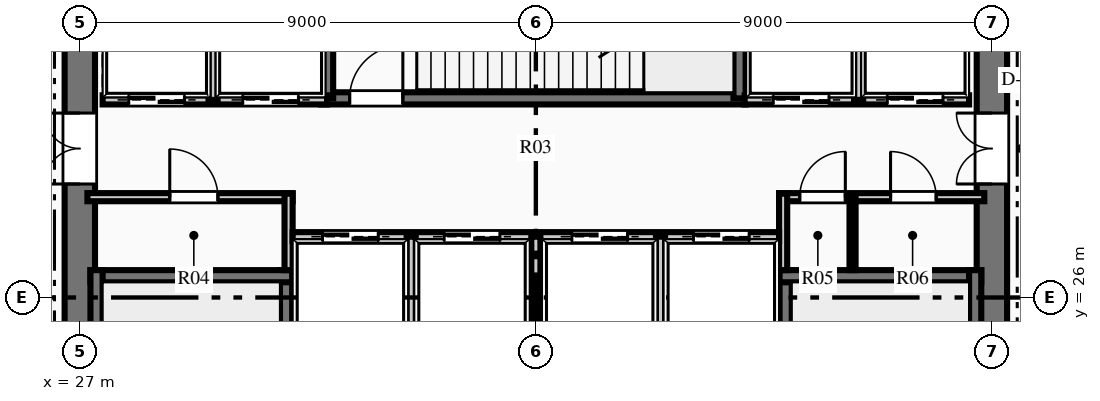
"""IFC4 building model, lengths in metres.
Left out: names, types, materials, properties, quantities, classifications, styles, units other than length and angle.
Written with IfcOpenShell. Run it as: python <this file> out.ifc"""

import sys

from ifc_helpers import new_model, si_unit, direction, frame, frame_2d, origin, place, context, subcontext, project, spatial, rectangle, extrude, element, fill, save


model = new_model("IFC4")
c1 = context("Model", 3, precision=1e-05, world=origin(), true_north=direction((0.0, 1.0)))
c2 = subcontext(c1, "Body", "Model", "MODEL_VIEW")
j1 = project(units=[si_unit("LENGTHUNIT", "METRE"), si_unit("PLANEANGLEUNIT", "RADIAN")], contexts=[c1])
p1 = place(None, origin())
s1 = spatial("IfcSite", under=j1, at=p1, CompositionType="ELEMENT")
p2 = place(p1, origin())
s2 = spatial("IfcBuilding", under=s1, at=p2, CompositionType="ELEMENT")
p3 = place(p2, origin())
s3 = spatial("IfcBuildingStorey", under=s2, at=p3, CompositionType="ELEMENT", Elevation=0.0)
p4 = place(p3, frame((27.0, 18.3, 0.0), z_axis=(0.0, 0.0, 1.0), x_axis=(0.0, 1.0, 0.0)))
e1 = element("IfcWall", 1, at=p4, inside=s3, PredefinedType="SHEAR", context=c2, shape_type="SweptSolid", body=[
    extrude(rectangle(XDim=15.4, YDim=0.6, at=frame_2d((7.7, 0.0))), origin(), (0.0, 0.0, 1.0), 6.0),
])
p5 = place(p4, frame((9.94, 0.0, 0.0)))
e2 = element("IfcOpeningElement", 2, at=p5, cuts=e1, PredefinedType="OPENING", context=c2, shape_type="SweptSolid", body=[
    extrude(rectangle(XDim=1.4, YDim=2.2, at=frame_2d((0.7, 1.1))), frame((0.0, 0.31, 0.0), z_axis=(0.0, -1.0, 0.0), x_axis=(1.0, 0.0, 0.0)), (0.0, 0.0, 1.0), 0.62),
])
p6 = place(p3, frame((45.0, 18.3, 0.0), z_axis=(0.0, 0.0, 1.0), x_axis=(0.0, 1.0, 0.0)))
e3 = element("IfcWall", 3, at=p6, inside=s3, PredefinedType="SHEAR", context=c2, shape_type="SweptSolid", body=[
    extrude(rectangle(XDim=15.4, YDim=0.6, at=frame_2d((7.7, 0.0))), origin(), (0.0, 0.0, 1.0), 6.0),
])
p7 = place(p6, frame((9.94, 0.0, 0.0)))
e4 = element("IfcOpeningElement", 4, at=p7, cuts=e3, PredefinedType="OPENING", context=c2, shape_type="SweptSolid", body=[
    extrude(rectangle(XDim=1.4, YDim=2.2, at=frame_2d((0.7, 1.1))), frame((0.0, 0.31, 0.0), z_axis=(0.0, -1.0, 0.0), x_axis=(1.0, 0.0, 0.0)), (0.0, 0.0, 1.0), 0.62),
])
p8 = place(p3, frame((31.07, 18.28, 0.0), z_axis=(0.0, 0.0, 1.0), x_axis=(0.0, 1.0, 0.0)))
e5 = element("IfcWall", 5, at=p8, inside=s3, PredefinedType="SHEAR", context=c2, shape_type="SweptSolid", body=[
    extrude(rectangle(XDim=8.26, YDim=0.24, at=frame_2d((4.13, 0.0))), origin(), (0.0, 0.0, 1.0), 6.0),
])
p9 = place(p8, frame((0.365, 0.0, 0.0)))
e6 = element("IfcOpeningElement", 6, at=p9, cuts=e5, PredefinedType="OPENING", context=c2, shape_type="SweptSolid", body=[
    extrude(rectangle(XDim=1.05, YDim=2.15, at=frame_2d((0.525, 1.075))), frame((0.0, 0.13, 0.0), z_axis=(0.0, -1.0, 0.0), x_axis=(1.0, 0.0, 0.0)), (0.0, 0.0, 1.0), 0.26),
])
p10 = place(p3, frame((27.21, 26.42, 0.0), z_axis=(0.0, 0.0, 1.0), x_axis=(1.0, 0.0, 0.0)))
e7 = element("IfcWall", 7, at=p10, inside=s3, PredefinedType="SHEAR", context=c2, shape_type="SweptSolid", body=[
    extrude(rectangle(XDim=3.98, YDim=0.24, at=frame_2d((1.99, 0.0))), origin(), (0.0, 0.0, 1.0), 6.0),
])
p11 = place(p3, frame((27.33, 18.28, 0.0), z_axis=(0.0, 0.0, 1.0), x_axis=(0.0, 1.0, 0.0)))
e8 = element("IfcWall", 8, at=p11, inside=s3, PredefinedType="SHEAR", context=c2, shape_type="SweptSolid", body=[
    extrude(rectangle(XDim=8.26, YDim=0.24, at=frame_2d((4.13, 0.0))), origin(), (0.0, 0.0, 1.0), 6.0),
])
p12 = place(p3, frame((40.93, 18.28, 0.0), z_axis=(0.0, 0.0, 1.0), x_axis=(0.0, 1.0, 0.0)))
e9 = element("IfcWall", 9, at=p12, inside=s3, PredefinedType="SHEAR", context=c2, shape_type="SweptSolid", body=[
    extrude(rectangle(XDim=8.26, YDim=0.24, at=frame_2d((4.13, 0.0))), origin(), (0.0, 0.0, 1.0), 6.0),
])
p13 = place(p12, frame((0.365, 0.0, 0.0)))
e10 = element("IfcOpeningElement", 10, at=p13, cuts=e9, PredefinedType="OPENING", context=c2, shape_type="SweptSolid", body=[
    extrude(rectangle(XDim=1.05, YDim=2.15, at=frame_2d((0.525, 1.075))), frame((0.0, 0.13, 0.0), z_axis=(0.0, -1.0, 0.0), x_axis=(1.0, 0.0, 0.0)), (0.0, 0.0, 1.0), 0.26),
])
p14 = place(p3, frame((40.81, 26.42, 0.0), z_axis=(0.0, 0.0, 1.0), x_axis=(1.0, 0.0, 0.0)))
e11 = element("IfcWall", 11, at=p14, inside=s3, PredefinedType="SHEAR", context=c2, shape_type="SweptSolid", body=[
    extrude(rectangle(XDim=3.98, YDim=0.24, at=frame_2d((1.99, 0.0))), origin(), (0.0, 0.0, 1.0), 6.0),
])
p15 = place(p3, frame((44.67, 18.28, 0.0), z_axis=(0.0, 0.0, 1.0), x_axis=(0.0, 1.0, 0.0)))
e12 = element("IfcWall", 12, at=p15, inside=s3, PredefinedType="SHEAR", context=c2, shape_type="SweptSolid", body=[
    extrude(rectangle(XDim=8.26, YDim=0.24, at=frame_2d((4.13, 0.0))), origin(), (0.0, 0.0, 1.0), 6.0),
])
p16 = place(p3, frame((31.76, 29.93, 0.0), z_axis=(0.0, 0.0, 1.0), x_axis=(1.0, 0.0, 0.0)))
e13 = element("IfcWall", 13, at=p16, inside=s3, PredefinedType="SHEAR", context=c2, shape_type="SweptSolid", body=[
    extrude(rectangle(XDim=8.38, YDim=0.24, at=frame_2d((4.19, 0.0))), origin(), (0.0, 0.0, 1.0), 6.0),
])
p17 = place(p16, frame((0.565, 0.0, 0.0)))
e14 = element("IfcOpeningElement", 14, at=p17, cuts=e13, PredefinedType="OPENING", context=c2, shape_type="SweptSolid", body=[
    extrude(rectangle(XDim=1.05, YDim=2.15, at=frame_2d((0.525, 1.075))), frame((0.0, 0.13, 0.0), z_axis=(0.0, -1.0, 0.0), x_axis=(1.0, 0.0, 0.0)), (0.0, 0.0, 1.0), 0.26),
])
p18 = place(p3, frame((31.88, 29.93, 0.0), z_axis=(0.0, 0.0, 1.0), x_axis=(0.0, 1.0, 0.0)))
e15 = element("IfcWall", 15, at=p18, inside=s3, PredefinedType="SHEAR", context=c2, shape_type="SweptSolid", body=[
    extrude(rectangle(XDim=3.79, YDim=0.24, at=frame_2d((1.895, 0.0))), origin(), (0.0, 0.0, 1.0), 6.0),
])
p19 = place(p3, frame((40.02, 29.93, 0.0), z_axis=(0.0, 0.0, 1.0), x_axis=(0.0, 1.0, 0.0)))
e16 = element("IfcWall", 16, at=p19, inside=s3, PredefinedType="SHEAR", context=c2, shape_type="SweptSolid", body=[
    extrude(rectangle(XDim=3.85, YDim=0.24, at=frame_2d((1.925, 0.0))), origin(), (0.0, 0.0, 1.0), 6.0),
])
p20 = place(p3, frame((27.15, 27.98, 0.0), z_axis=(0.0, 0.0, 1.0), x_axis=(1.0, 0.0, 0.0)))
e17 = element("IfcWall", 17, at=p20, inside=s3, PredefinedType="PARTITIONING", context=c2, shape_type="SweptSolid", body=[
    extrude(rectangle(XDim=4.05, YDim=0.16, at=frame_2d((2.025, 0.0))), origin(), (0.0, 0.0, 1.0), 5.67),
])
p21 = place(p20, frame((1.625, 0.0, 0.0)))
e18 = element("IfcOpeningElement", 18, at=p21, cuts=e17, PredefinedType="OPENING", context=c2, shape_type="SweptSolid", body=[
    extrude(rectangle(XDim=0.95, YDim=2.15, at=frame_2d((0.475, 1.075))), frame((0.0, 0.09, 0.0), z_axis=(0.0, -1.0, 0.0), x_axis=(1.0, 0.0, 0.0)), (0.0, 0.0, 1.0), 0.18),
])
p22 = place(p3, frame((31.12, 26.54, 0.0), z_axis=(0.0, 0.0, 1.0), x_axis=(0.0, 1.0, 0.0)))
e19 = element("IfcWall", 19, at=p22, inside=s3, PredefinedType="PARTITIONING", context=c2, shape_type="SweptSolid", body=[
    extrude(rectangle(XDim=1.51, YDim=0.16, at=frame_2d((0.755, 0.0))), origin(), (0.0, 0.0, 1.0), 5.67),
])
p23 = place(p3, frame((40.8, 27.98, 0.0), z_axis=(0.0, 0.0, 1.0), x_axis=(1.0, 0.0, 0.0)))
e20 = element("IfcWall", 20, at=p23, inside=s3, PredefinedType="PARTITIONING", context=c2, shape_type="SweptSolid", body=[
    extrude(rectangle(XDim=4.05, YDim=0.16, at=frame_2d((2.025, 0.0))), origin(), (0.0, 0.0, 1.0), 5.67),
])
p24 = place(p23, frame((0.407, 0.0, 0.0)))
e21 = element("IfcOpeningElement", 21, at=p24, cuts=e20, PredefinedType="OPENING", context=c2, shape_type="SweptSolid", body=[
    extrude(rectangle(XDim=0.9, YDim=2.15, at=frame_2d((0.45, 1.075))), frame((0.0, 0.09, 0.0), z_axis=(0.0, -1.0, 0.0), x_axis=(1.0, 0.0, 0.0)), (0.0, 0.0, 1.0), 0.18),
])
p25 = place(p23, frame((2.2, 0.0, 0.0)))
e22 = element("IfcOpeningElement", 22, at=p25, cuts=e20, PredefinedType="OPENING", context=c2, shape_type="SweptSolid", body=[
    extrude(rectangle(XDim=0.9, YDim=2.15, at=frame_2d((0.45, 1.075))), frame((0.0, 0.09, 0.0), z_axis=(0.0, -1.0, 0.0), x_axis=(1.0, 0.0, 0.0)), (0.0, 0.0, 1.0), 0.18),
])
p26 = place(p3, frame((40.88, 26.54, 0.0), z_axis=(0.0, 0.0, 1.0), x_axis=(0.0, 1.0, 0.0)))
e23 = element("IfcWall", 23, at=p26, inside=s3, PredefinedType="PARTITIONING", context=c2, shape_type="SweptSolid", body=[
    extrude(rectangle(XDim=1.51, YDim=0.16, at=frame_2d((0.755, 0.0))), origin(), (0.0, 0.0, 1.0), 5.67),
])
p27 = place(p3, frame((42.25, 26.54, 0.0), z_axis=(0.0, 0.0, 1.0), x_axis=(0.0, 1.0, 0.0)))
e24 = element("IfcWall", 24, at=p27, inside=s3, PredefinedType="PARTITIONING", context=c2, shape_type="SweptSolid", body=[
    extrude(rectangle(XDim=1.44, YDim=0.12, at=frame_2d((0.72, 0.0))), origin(), (0.0, 0.0, 1.0), 5.67),
])
p28 = place(p3, frame((27.45, 29.9, 0.0), z_axis=(0.0, 0.0, 1.0), x_axis=(1.0, 0.0, 0.0)))
e25 = element("IfcWall", 25, at=p28, inside=s3, PredefinedType="PARTITIONING", context=c2, shape_type="SweptSolid", body=[
    extrude(rectangle(XDim=4.43, YDim=0.18, at=frame_2d((2.215, 0.0))), origin(), (0.0, 0.0, 1.0), 5.67),
])
p29 = place(p28, frame((0.515, 0.0, 0.0)))
e26 = element("IfcOpeningElement", 26, at=p29, cuts=e25, PredefinedType="OPENING", context=c2, shape_type="SweptSolid", body=[
    extrude(rectangle(XDim=1.1, YDim=2.15, at=frame_2d((0.55, 1.075))), frame((0.0, 0.1, 0.0), z_axis=(0.0, -1.0, 0.0), x_axis=(1.0, 0.0, 0.0)), (0.0, 0.0, 1.0), 0.2),
])
p30 = place(p28, frame((2.765, 0.0, 0.0)))
e27 = element("IfcOpeningElement", 27, at=p30, cuts=e25, PredefinedType="OPENING", context=c2, shape_type="SweptSolid", body=[
    extrude(rectangle(XDim=1.1, YDim=2.15, at=frame_2d((0.55, 1.075))), frame((0.0, 0.1, 0.0), z_axis=(0.0, -1.0, 0.0), x_axis=(1.0, 0.0, 0.0)), (0.0, 0.0, 1.0), 0.2),
])
p31 = place(p3, frame((29.63, 29.9, 0.0), z_axis=(0.0, 0.0, 1.0), x_axis=(0.0, 1.0, 0.0)))
e28 = element("IfcWall", 28, at=p31, inside=s3, PredefinedType="PARTITIONING", context=c2, shape_type="SweptSolid", body=[
    extrude(rectangle(XDim=3.75, YDim=0.18, at=frame_2d((1.875, 0.0))), origin(), (0.0, 0.0, 1.0), 5.67),
])
p32 = place(p3, frame((40.12, 29.9, 0.0), z_axis=(0.0, 0.0, 1.0), x_axis=(1.0, 0.0, 0.0)))
e29 = element("IfcWall", 29, at=p32, inside=s3, PredefinedType="PARTITIONING", context=c2, shape_type="SweptSolid", body=[
    extrude(rectangle(XDim=4.43, YDim=0.18, at=frame_2d((2.215, 0.0))), origin(), (0.0, 0.0, 1.0), 5.67),
])
p33 = place(p32, frame((0.565, 0.0, 0.0)))
e30 = element("IfcOpeningElement", 30, at=p33, cuts=e29, PredefinedType="OPENING", context=c2, shape_type="SweptSolid", body=[
    extrude(rectangle(XDim=1.1, YDim=2.15, at=frame_2d((0.55, 1.075))), frame((0.0, 0.1, 0.0), z_axis=(0.0, -1.0, 0.0), x_axis=(1.0, 0.0, 0.0)), (0.0, 0.0, 1.0), 0.2),
])
p34 = place(p32, frame((2.815, 0.0, 0.0)))
e31 = element("IfcOpeningElement", 31, at=p34, cuts=e29, PredefinedType="OPENING", context=c2, shape_type="SweptSolid", body=[
    extrude(rectangle(XDim=1.1, YDim=2.15, at=frame_2d((0.55, 1.075))), frame((0.0, 0.1, 0.0), z_axis=(0.0, -1.0, 0.0), x_axis=(1.0, 0.0, 0.0)), (0.0, 0.0, 1.0), 0.2),
])
p35 = place(p3, frame((42.37, 29.9, 0.0), z_axis=(0.0, 0.0, 1.0), x_axis=(0.0, 1.0, 0.0)))
e32 = element("IfcWall", 32, at=p35, inside=s3, PredefinedType="PARTITIONING", context=c2, shape_type="SweptSolid", body=[
    extrude(rectangle(XDim=3.75, YDim=0.18, at=frame_2d((1.875, 0.0))), origin(), (0.0, 0.0, 1.0), 5.67),
])
p36 = place(p3, frame((31.2, 27.2, 0.0), z_axis=(0.0, 0.0, 1.0), x_axis=(1.0, 0.0, 0.0)))
e33 = element("IfcWall", 33, at=p36, inside=s3, PredefinedType="PARTITIONING", context=c2, shape_type="SweptSolid", body=[
    extrude(rectangle(XDim=9.6, YDim=0.18, at=frame_2d((4.8, 0.0))), origin(), (0.0, 0.0, 1.0), 5.67),
])
p37 = place(p36, frame((0.59, 0.0, 0.0)))
e34 = element("IfcOpeningElement", 34, at=p37, cuts=e33, PredefinedType="OPENING", context=c2, shape_type="SweptSolid", body=[
    extrude(rectangle(XDim=1.1, YDim=2.15, at=frame_2d((0.55, 1.075))), frame((0.0, 0.1, 0.0), z_axis=(0.0, -1.0, 0.0), x_axis=(1.0, 0.0, 0.0)), (0.0, 0.0, 1.0), 0.2),
])
p38 = place(p36, frame((2.99, 0.0, 0.0)))
e35 = element("IfcOpeningElement", 35, at=p38, cuts=e33, PredefinedType="OPENING", context=c2, shape_type="SweptSolid", body=[
    extrude(rectangle(XDim=1.1, YDim=2.15, at=frame_2d((0.55, 1.075))), frame((0.0, 0.1, 0.0), z_axis=(0.0, -1.0, 0.0), x_axis=(1.0, 0.0, 0.0)), (0.0, 0.0, 1.0), 0.2),
])
p39 = place(p36, frame((5.51, 0.0, 0.0)))
e36 = element("IfcOpeningElement", 36, at=p39, cuts=e33, PredefinedType="OPENING", context=c2, shape_type="SweptSolid", body=[
    extrude(rectangle(XDim=1.1, YDim=2.15, at=frame_2d((0.55, 1.075))), frame((0.0, 0.1, 0.0), z_axis=(0.0, -1.0, 0.0), x_axis=(1.0, 0.0, 0.0)), (0.0, 0.0, 1.0), 0.2),
])
p40 = place(p36, frame((7.91, 0.0, 0.0)))
e37 = element("IfcOpeningElement", 37, at=p40, cuts=e33, PredefinedType="OPENING", context=c2, shape_type="SweptSolid", body=[
    extrude(rectangle(XDim=1.1, YDim=2.15, at=frame_2d((0.55, 1.075))), frame((0.0, 0.1, 0.0), z_axis=(0.0, -1.0, 0.0), x_axis=(1.0, 0.0, 0.0)), (0.0, 0.0, 1.0), 0.2),
])
for number, where, z_axis, x_axis in (
    (38, (33.54, 25.3, 0.0), (0.0, 0.0, 1.0), (0.0, 1.0, 0.0)),
    (39, (36.0, 25.3, 0.0), (0.0, 0.0, 1.0), (0.0, 1.0, 0.0)),
    (40, (38.46, 25.3, 0.0), (0.0, 0.0, 1.0), (0.0, 1.0, 0.0)),
):
    element("IfcWall", number, at=place(p3, frame(where, z_axis=z_axis, x_axis=x_axis)), inside=s3, PredefinedType="PARTITIONING", context=c2, shape_type="SweptSolid", body=[
        extrude(rectangle(XDim=1.9, YDim=0.18, at=frame_2d((0.95, 0.0))), origin(), (0.0, 0.0, 1.0), 5.67),
    ])
p41 = place(p21, origin())
e41 = element("IfcDoor", 41, at=p41, inside=s3, OperationType="SINGLE_SWING_LEFT", PredefinedType="DOOR", context=c2, shape_type="SweptSolid", body=[
    extrude(rectangle(XDim=0.95, YDim=2.15, at=frame_2d((0.475, 1.075))), frame((0.0, 0.025, 0.0), z_axis=(0.0, -1.0, 0.0), x_axis=(1.0, 0.0, 0.0)), (0.0, 0.0, 1.0), 0.05),
])
fill(e18, e41)
p42 = place(p24, origin())
e42 = element("IfcDoor", 42, at=p42, inside=s3, OperationType="SINGLE_SWING_RIGHT", PredefinedType="DOOR", context=c2, shape_type="SweptSolid", body=[
    extrude(rectangle(XDim=0.9, YDim=2.15, at=frame_2d((0.45, 1.075))), frame((0.0, 0.025, 0.0), z_axis=(0.0, -1.0, 0.0), x_axis=(1.0, 0.0, 0.0)), (0.0, 0.0, 1.0), 0.05),
])
fill(e21, e42)
p43 = place(p25, origin())
e43 = element("IfcDoor", 43, at=p43, inside=s3, OperationType="SINGLE_SWING_LEFT", PredefinedType="DOOR", context=c2, shape_type="SweptSolid", body=[
    extrude(rectangle(XDim=0.9, YDim=2.15, at=frame_2d((0.45, 1.075))), frame((0.0, 0.025, 0.0), z_axis=(0.0, -1.0, 0.0), x_axis=(1.0, 0.0, 0.0)), (0.0, 0.0, 1.0), 0.05),
])
fill(e22, e43)
p44 = place(p17, origin())
e44 = element("IfcDoor", 44, at=p44, inside=s3, OperationType="SINGLE_SWING_RIGHT", PredefinedType="DOOR", context=c2, shape_type="SweptSolid", body=[
    extrude(rectangle(XDim=1.05, YDim=2.15, at=frame_2d((0.525, 1.075))), frame((0.0, 0.025, 0.0), z_axis=(0.0, -1.0, 0.0), x_axis=(1.0, 0.0, 0.0)), (0.0, 0.0, 1.0), 0.05),
])
fill(e14, e44)
p45 = place(p5, origin())
e45 = element("IfcDoor", 45, at=p45, inside=s3, OperationType="DOUBLE_DOOR_SINGLE_SWING", PredefinedType="DOOR", context=c2, shape_type="SweptSolid", body=[
    extrude(rectangle(XDim=1.4, YDim=2.2, at=frame_2d((0.7, 1.1))), frame((0.0, 0.025, 0.0), z_axis=(0.0, -1.0, 0.0), x_axis=(1.0, 0.0, 0.0)), (0.0, 0.0, 1.0), 0.05),
])
fill(e2, e45)
p46 = place(p7, origin())
e46 = element("IfcDoor", 46, at=p46, inside=s3, OperationType="DOUBLE_DOOR_SINGLE_SWING", PredefinedType="DOOR", context=c2, shape_type="SweptSolid", body=[
    extrude(rectangle(XDim=1.4, YDim=2.2, at=frame_2d((0.7, 1.1))), frame((0.0, 0.025, 0.0), z_axis=(0.0, -1.0, 0.0), x_axis=(1.0, 0.0, 0.0)), (0.0, 0.0, 1.0), 0.05),
])
fill(e4, e46)
p47 = place(p29, origin())
e47 = element("IfcDoor", 47, at=p47, inside=s3, OperationType="SLIDING_TO_LEFT", PredefinedType="DOOR", context=c2, shape_type="SweptSolid", body=[
    extrude(rectangle(XDim=1.1, YDim=2.15, at=frame_2d((0.55, 1.075))), frame((0.0, 0.025, 0.0), z_axis=(0.0, -1.0, 0.0), x_axis=(1.0, 0.0, 0.0)), (0.0, 0.0, 1.0), 0.05),
])
fill(e26, e47)
p48 = place(p30, origin())
e48 = element("IfcDoor", 48, at=p48, inside=s3, OperationType="SLIDING_TO_LEFT", PredefinedType="DOOR", context=c2, shape_type="SweptSolid", body=[
    extrude(rectangle(XDim=1.1, YDim=2.15, at=frame_2d((0.55, 1.075))), frame((0.0, 0.025, 0.0), z_axis=(0.0, -1.0, 0.0), x_axis=(1.0, 0.0, 0.0)), (0.0, 0.0, 1.0), 0.05),
])
fill(e27, e48)
p49 = place(p33, origin())
e49 = element("IfcDoor", 49, at=p49, inside=s3, OperationType="SLIDING_TO_LEFT", PredefinedType="DOOR", context=c2, shape_type="SweptSolid", body=[
    extrude(rectangle(XDim=1.1, YDim=2.15, at=frame_2d((0.55, 1.075))), frame((0.0, 0.025, 0.0), z_axis=(0.0, -1.0, 0.0), x_axis=(1.0, 0.0, 0.0)), (0.0, 0.0, 1.0), 0.05),
])
fill(e30, e49)
p50 = place(p34, origin())
e50 = element("IfcDoor", 50, at=p50, inside=s3, OperationType="SLIDING_TO_LEFT", PredefinedType="DOOR", context=c2, shape_type="SweptSolid", body=[
    extrude(rectangle(XDim=1.1, YDim=2.15, at=frame_2d((0.55, 1.075))), frame((0.0, 0.025, 0.0), z_axis=(0.0, -1.0, 0.0), x_axis=(1.0, 0.0, 0.0)), (0.0, 0.0, 1.0), 0.05),
])
fill(e31, e50)
p51 = place(p37, origin())
e51 = element("IfcDoor", 51, at=p51, inside=s3, OperationType="SLIDING_TO_LEFT", PredefinedType="DOOR", context=c2, shape_type="SweptSolid", body=[
    extrude(rectangle(XDim=1.1, YDim=2.15, at=frame_2d((0.55, 1.075))), frame((0.0, 0.025, 0.0), z_axis=(0.0, -1.0, 0.0), x_axis=(1.0, 0.0, 0.0)), (0.0, 0.0, 1.0), 0.05),
])
fill(e34, e51)
p52 = place(p38, origin())
e52 = element("IfcDoor", 52, at=p52, inside=s3, OperationType="SLIDING_TO_LEFT", PredefinedType="DOOR", context=c2, shape_type="SweptSolid", body=[
    extrude(rectangle(XDim=1.1, YDim=2.15, at=frame_2d((0.55, 1.075))), frame((0.0, 0.025, 0.0), z_axis=(0.0, -1.0, 0.0), x_axis=(1.0, 0.0, 0.0)), (0.0, 0.0, 1.0), 0.05),
])
fill(e35, e52)
p53 = place(p39, origin())
e53 = element("IfcDoor", 53, at=p53, inside=s3, OperationType="SLIDING_TO_LEFT", PredefinedType="DOOR", context=c2, shape_type="SweptSolid", body=[
    extrude(rectangle(XDim=1.1, YDim=2.15, at=frame_2d((0.55, 1.075))), frame((0.0, 0.025, 0.0), z_axis=(0.0, -1.0, 0.0), x_axis=(1.0, 0.0, 0.0)), (0.0, 0.0, 1.0), 0.05),
])
fill(e36, e53)
p54 = place(p40, origin())
e54 = element("IfcDoor", 54, at=p54, inside=s3, OperationType="SLIDING_TO_LEFT", PredefinedType="DOOR", context=c2, shape_type="SweptSolid", body=[
    extrude(rectangle(XDim=1.1, YDim=2.15, at=frame_2d((0.55, 1.075))), frame((0.0, 0.025, 0.0), z_axis=(0.0, -1.0, 0.0), x_axis=(1.0, 0.0, 0.0)), (0.0, 0.0, 1.0), 0.05),
])
fill(e37, e54)
save(model, sys.argv[1])
